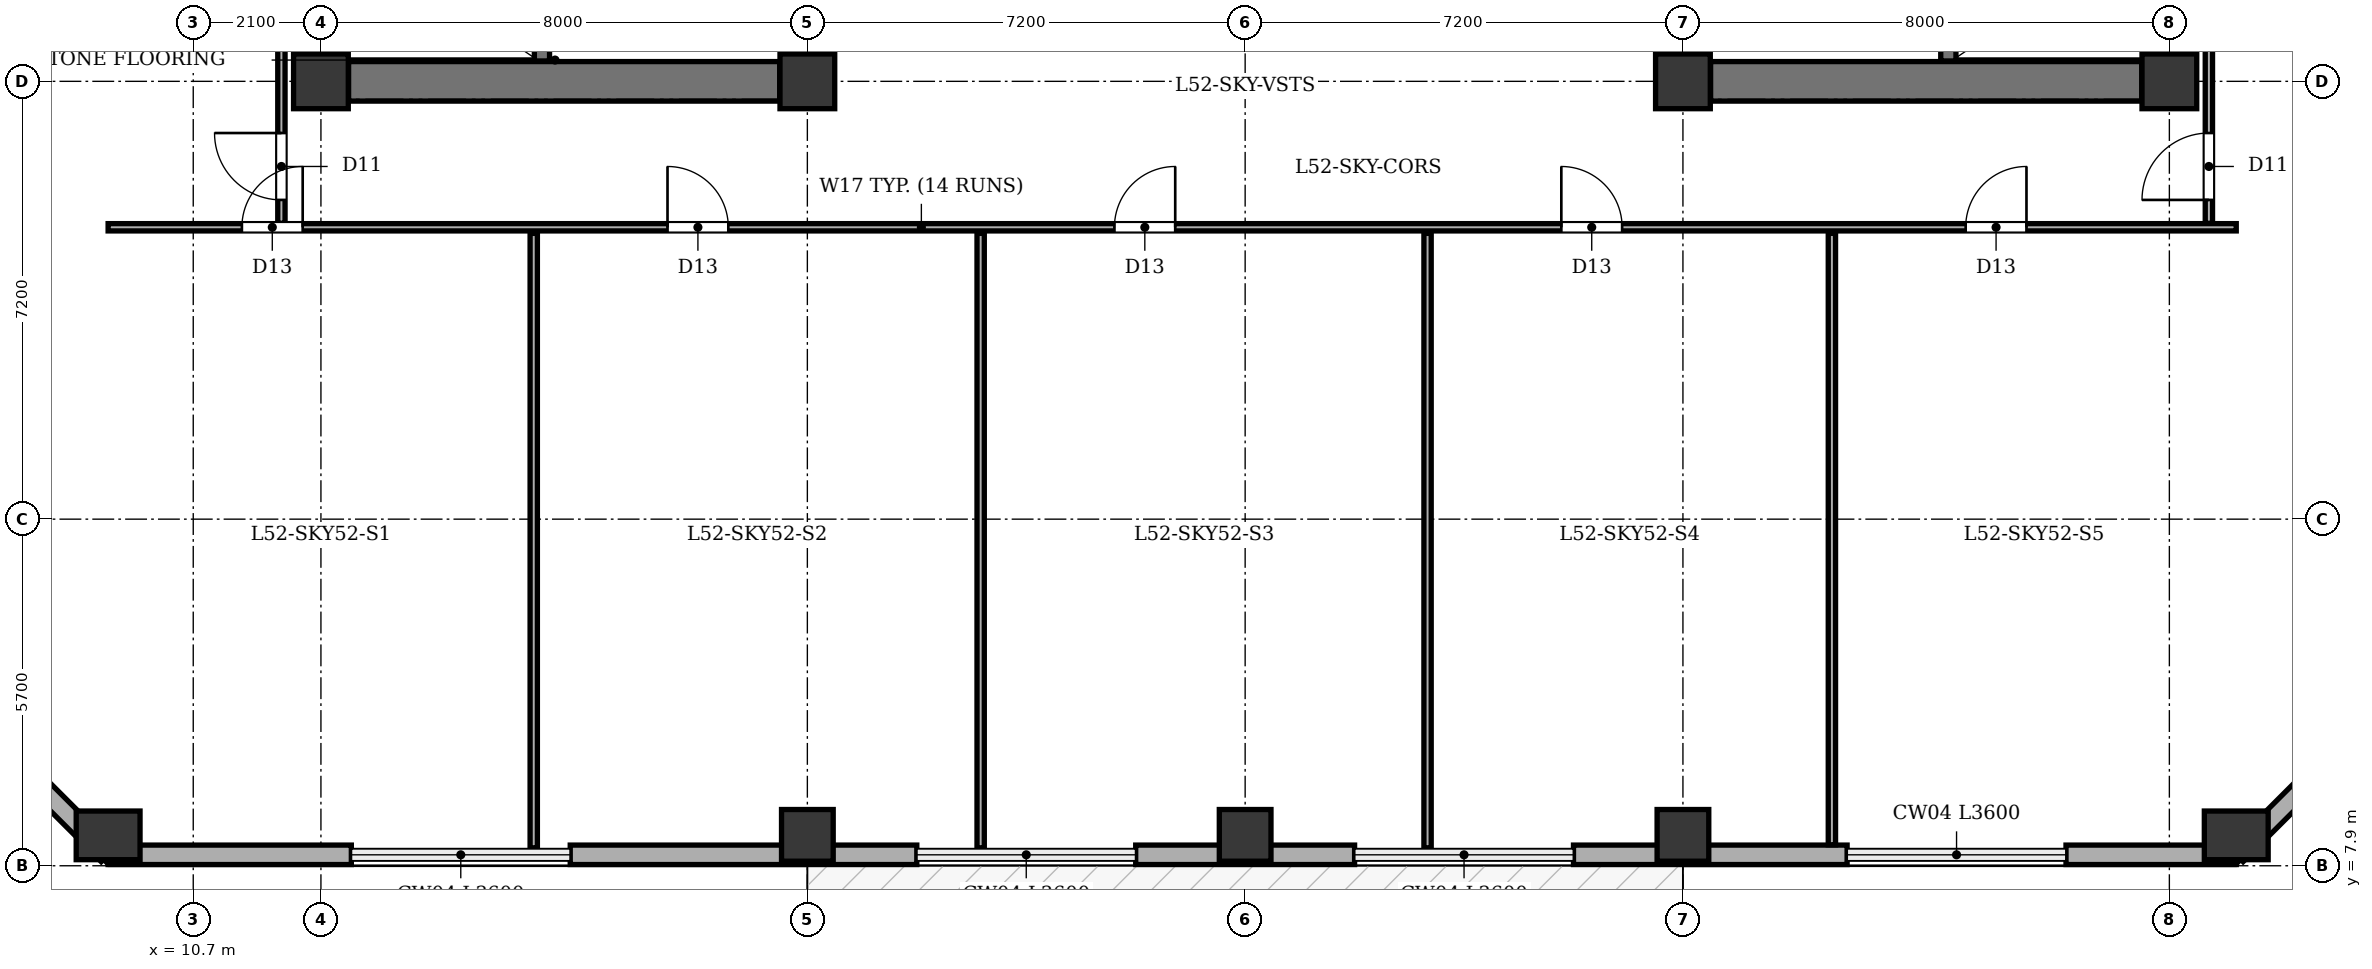
"""IFC4 building model, lengths in metres.
Left out: names, types, materials, properties, quantities, classifications, styles, units other than length and angle.
Written with IfcOpenShell. Run it as: python <this file> out.ifc"""

import sys

from ifc_helpers import new_model, si_unit, direction, frame, frame_2d, origin, origin_2d, place, context, subcontext, project, spatial, rectangle, extrude, element, fill, save


model = new_model("IFC4")
c1 = context("Model", 3, precision=1e-05, world=origin(), true_north=direction((0.0, 1.0)))
c2 = subcontext(c1, "Body", "Model", "MODEL_VIEW")
j1 = project(units=[si_unit("LENGTHUNIT", "METRE"), si_unit("PLANEANGLEUNIT", "RADIAN")], contexts=[c1])
p1 = place(None, origin())
s1 = spatial("IfcSite", under=j1, at=p1, CompositionType="ELEMENT")
p2 = place(p1, origin())
s2 = spatial("IfcBuilding", under=s1, at=p2, CompositionType="ELEMENT")
p3 = place(p2, frame((0.0, 0.0, 202.7)))
s3 = spatial("IfcBuildingStorey", under=s2, at=p3, CompositionType="ELEMENT", Elevation=202.7)
for number, where, z_axis, x_axis in (
    (1, (12.8, 20.8, 0.0), (0.0, 0.0, 1.0), (1.0, 0.0, 0.0)),
    (2, (20.8, 20.8, 0.0), (0.0, 0.0, 1.0), (1.0, 0.0, 0.0)),
    (3, (35.2, 20.8, 0.0), (0.0, 0.0, 1.0), (1.0, 0.0, 0.0)),
    (4, (43.2, 20.8, 0.0), (0.0, 0.0, 1.0), (1.0, 0.0, 0.0)),
):
    element("IfcColumn", number, at=place(p3, frame(where, z_axis=z_axis, x_axis=x_axis)), inside=s3, PredefinedType="COLUMN", context=c2, shape_type="SweptSolid", body=[
        extrude(rectangle(XDim=0.9, YDim=0.9, at=origin_2d()), origin(), (0.0, 0.0, 1.0), 4.8),
    ])
p4 = place(p3, frame((9.3, 8.4, 0.0), z_axis=(0.0, 0.0, 1.0), x_axis=(1.0, 0.0, 0.0)))
e5 = element("IfcColumn", 5, at=p4, inside=s3, PredefinedType="COLUMN", context=c2, shape_type="SweptSolid", body=[
    extrude(rectangle(XDim=0.8, YDim=1.05, at=origin_2d()), origin(), (0.0, 0.0, 1.0), 4.8),
])
for number, where, z_axis, x_axis in (
    (6, (20.8, 8.4, 0.0), (0.0, 0.0, 1.0), (1.0, 0.0, 0.0)),
    (7, (28.0, 8.4, 0.0), (0.0, 0.0, 1.0), (1.0, 0.0, 0.0)),
    (8, (35.2, 8.4, 0.0), (0.0, 0.0, 1.0), (1.0, 0.0, 0.0)),
):
    element("IfcColumn", number, at=place(p3, frame(where, z_axis=z_axis, x_axis=x_axis)), inside=s3, PredefinedType="COLUMN", context=c2, shape_type="SweptSolid", body=[
        extrude(rectangle(XDim=0.85, YDim=0.85, at=origin_2d()), origin(), (0.0, 0.0, 1.0), 4.8),
    ])
p5 = place(p3, frame((44.3, 8.4, 0.0), z_axis=(0.0, 0.0, 1.0), x_axis=(1.0, 0.0, 0.0)))
e9 = element("IfcColumn", 9, at=p5, inside=s3, PredefinedType="COLUMN", context=c2, shape_type="SweptSolid", body=[
    extrude(rectangle(XDim=0.8, YDim=1.05, at=origin_2d()), origin(), (0.0, 0.0, 1.0), 4.8),
])
p6 = place(p3, frame((44.3, 8.08, 0.0), z_axis=(0.0, 0.0, 1.0), x_axis=(-1.0, 0.0, 0.0)))
e10 = element("IfcWall", 10, at=p6, inside=s3, PredefinedType="STANDARD", context=c2, shape_type="SweptSolid", body=[
    extrude(rectangle(XDim=2.8, YDim=0.32, at=frame_2d((1.4, 0.0))), origin(), (0.0, 0.0, 1.0), 3.735),
])
p7 = place(p3, frame((37.9, 8.08, 0.0), z_axis=(0.0, 0.0, 1.0), x_axis=(-1.0, 0.0, 0.0)))
e11 = element("IfcWall", 11, at=p7, inside=s3, PredefinedType="STANDARD", context=c2, shape_type="SweptSolid", body=[
    extrude(rectangle(XDim=4.5, YDim=0.32, at=frame_2d((2.25, 0.0))), origin(), (0.0, 0.0, 1.0), 3.735),
])
p8 = place(p3, frame((29.8, 8.08, 0.0), z_axis=(0.0, 0.0, 1.0), x_axis=(-1.0, 0.0, 0.0)))
e12 = element("IfcWall", 12, at=p8, inside=s3, PredefinedType="STANDARD", context=c2, shape_type="SweptSolid", body=[
    extrude(rectangle(XDim=3.6, YDim=0.32, at=frame_2d((1.8, 0.0))), origin(), (0.0, 0.0, 1.0), 3.735),
])
p9 = place(p3, frame((22.6, 8.08, 0.0), z_axis=(0.0, 0.0, 1.0), x_axis=(-1.0, 0.0, 0.0)))
e13 = element("IfcWall", 13, at=p9, inside=s3, PredefinedType="STANDARD", context=c2, shape_type="SweptSolid", body=[
    extrude(rectangle(XDim=5.7, YDim=0.32, at=frame_2d((2.85, 0.0))), origin(), (0.0, 0.0, 1.0), 3.735),
])
p10 = place(p3, frame((13.3, 8.08, 0.0), z_axis=(0.0, 0.0, 1.0), x_axis=(-1.0, 0.0, 0.0)))
e14 = element("IfcWall", 14, at=p10, inside=s3, PredefinedType="STANDARD", context=c2, shape_type="SweptSolid", body=[
    extrude(rectangle(XDim=4.0, YDim=0.32, at=frame_2d((2.0, 0.0))), origin(), (0.0, 0.0, 1.0), 3.735),
])
for number, where, z_axis, x_axis in (
    (15, (9.3, 8.08, 0.0), (0.0, 0.0, 1.0), (-0.707, 0.707, 0.0)),
    (16, (49.12, 12.9, 0.0), (0.0, 0.0, 1.0), (-0.707, -0.707, 0.0)),
):
    element("IfcWall", number, at=place(p3, frame(where, z_axis=z_axis, x_axis=x_axis)), inside=s3, PredefinedType="STANDARD", context=c2, shape_type="SweptSolid", body=[
        extrude(rectangle(XDim=6.816, YDim=0.32, at=frame_2d((3.408, 0.0))), origin(), (0.0, 0.0, 1.0), 3.735),
    ])
p11 = place(p3, frame((12.8, 21.255, 0.0), z_axis=(0.0, 0.0, 1.0), x_axis=(0.0, 1.0, 0.0)))
e17 = element("IfcWall", 17, at=p11, inside=s3, PredefinedType="SHEAR", context=c2, shape_type="SweptSolid", body=[
    extrude(rectangle(XDim=11.89, YDim=0.65, at=frame_2d((5.945, 0.0))), origin(), (0.0, 0.0, 1.0), 4.35),
])
p12 = place(p3, frame((13.255, 20.8, 0.0), z_axis=(0.0, 0.0, 1.0), x_axis=(1.0, 0.0, 0.0)))
e18 = element("IfcWall", 18, at=p12, inside=s3, PredefinedType="SHEAR", context=c2, shape_type="SweptSolid", body=[
    extrude(rectangle(XDim=7.09, YDim=0.65, at=frame_2d((3.545, 0.0))), origin(), (0.0, 0.0, 1.0), 4.35),
])
p13 = place(p3, frame((20.8, 21.255, 0.0), z_axis=(0.0, 0.0, 1.0), x_axis=(0.0, 1.0, 0.0)))
e19 = element("IfcWall", 19, at=p13, inside=s3, PredefinedType="SHEAR", context=c2, shape_type="SweptSolid", body=[
    extrude(rectangle(XDim=3.795, YDim=0.65, at=frame_2d((1.897, 0.0))), origin(), (0.0, 0.0, 1.0), 4.35),
])
p14 = place(p13, frame((1.345, 0.0, 0.0)))
e20 = element("IfcOpeningElement", 20, at=p14, cuts=e19, PredefinedType="OPENING", context=c2, shape_type="SweptSolid", body=[
    extrude(rectangle(XDim=1.2, YDim=2.15, at=frame_2d((0.6, 1.075))), frame((0.0, 0.335, 0.0), z_axis=(0.0, -1.0, 0.0), x_axis=(1.0, 0.0, 0.0)), (0.0, 0.0, 1.0), 0.67),
])
p15 = place(p3, frame((16.435, 21.135, 0.0), z_axis=(0.0, 0.0, 1.0), x_axis=(0.0, 1.0, 0.0)))
e21 = element("IfcWall", 21, at=p15, inside=s3, PredefinedType="SHEAR", context=c2, shape_type="SweptSolid", body=[
    extrude(rectangle(XDim=12.13, YDim=0.25, at=frame_2d((6.065, 0.0))), origin(), (0.0, 0.0, 1.0), 4.35),
])
p16 = place(p15, frame((0.515, 0.0, 0.0)))
e22 = element("IfcOpeningElement", 22, at=p16, cuts=e21, PredefinedType="OPENING", context=c2, shape_type="SweptSolid", body=[
    extrude(rectangle(XDim=1.2, YDim=2.15, at=frame_2d((0.6, 1.075))), frame((0.0, 0.135, 0.0), z_axis=(0.0, -1.0, 0.0), x_axis=(1.0, 0.0, 0.0)), (0.0, 0.0, 1.0), 0.27),
])
p17 = place(p15, frame((2.665, 0.0, 0.0)))
e23 = element("IfcOpeningElement", 23, at=p17, cuts=e21, PredefinedType="OPENING", context=c2, shape_type="SweptSolid", body=[
    extrude(rectangle(XDim=1.15, YDim=2.15, at=frame_2d((0.575, 1.075))), frame((0.0, 0.135, 0.0), z_axis=(0.0, -1.0, 0.0), x_axis=(1.0, 0.0, 0.0)), (0.0, 0.0, 1.0), 0.27),
])
p18 = place(p3, frame((43.2, 21.255, 0.0), z_axis=(0.0, 0.0, 1.0), x_axis=(0.0, 1.0, 0.0)))
e24 = element("IfcWall", 24, at=p18, inside=s3, PredefinedType="SHEAR", context=c2, shape_type="SweptSolid", body=[
    extrude(rectangle(XDim=11.89, YDim=0.65, at=frame_2d((5.945, 0.0))), origin(), (0.0, 0.0, 1.0), 4.35),
])
p19 = place(p3, frame((35.655, 20.8, 0.0), z_axis=(0.0, 0.0, 1.0), x_axis=(1.0, 0.0, 0.0)))
e25 = element("IfcWall", 25, at=p19, inside=s3, PredefinedType="SHEAR", context=c2, shape_type="SweptSolid", body=[
    extrude(rectangle(XDim=7.09, YDim=0.65, at=frame_2d((3.545, 0.0))), origin(), (0.0, 0.0, 1.0), 4.35),
])
p20 = place(p3, frame((35.2, 21.255, 0.0), z_axis=(0.0, 0.0, 1.0), x_axis=(0.0, 1.0, 0.0)))
e26 = element("IfcWall", 26, at=p20, inside=s3, PredefinedType="SHEAR", context=c2, shape_type="SweptSolid", body=[
    extrude(rectangle(XDim=11.89, YDim=0.65, at=frame_2d((5.945, 0.0))), origin(), (0.0, 0.0, 1.0), 4.35),
])
p21 = place(p20, frame((1.345, 0.0, 0.0)))
e27 = element("IfcOpeningElement", 27, at=p21, cuts=e26, PredefinedType="OPENING", context=c2, shape_type="SweptSolid", body=[
    extrude(rectangle(XDim=1.2, YDim=2.15, at=frame_2d((0.6, 1.075))), frame((0.0, 0.335, 0.0), z_axis=(0.0, -1.0, 0.0), x_axis=(1.0, 0.0, 0.0)), (0.0, 0.0, 1.0), 0.67),
])
p22 = place(p20, frame((4.345, 0.0, 0.0)))
e28 = element("IfcOpeningElement", 28, at=p22, cuts=e26, PredefinedType="OPENING", context=c2, shape_type="SweptSolid", body=[
    extrude(rectangle(XDim=1.1, YDim=2.1, at=frame_2d((0.55, 1.05))), frame((0.0, 0.335, 0.0), z_axis=(0.0, -1.0, 0.0), x_axis=(1.0, 0.0, 0.0)), (0.0, 0.0, 1.0), 0.67),
])
p23 = place(p20, frame((6.295, 0.0, 0.0)))
e29 = element("IfcOpeningElement", 29, at=p23, cuts=e26, PredefinedType="OPENING", context=c2, shape_type="SweptSolid", body=[
    extrude(rectangle(XDim=1.1, YDim=2.1, at=frame_2d((0.55, 1.05))), frame((0.0, 0.335, 0.0), z_axis=(0.0, -1.0, 0.0), x_axis=(1.0, 0.0, 0.0)), (0.0, 0.0, 1.0), 0.67),
])
p24 = place(p20, frame((8.245, 0.0, 0.0)))
e30 = element("IfcOpeningElement", 30, at=p24, cuts=e26, PredefinedType="OPENING", context=c2, shape_type="SweptSolid", body=[
    extrude(rectangle(XDim=1.1, YDim=2.1, at=frame_2d((0.55, 1.05))), frame((0.0, 0.335, 0.0), z_axis=(0.0, -1.0, 0.0), x_axis=(1.0, 0.0, 0.0)), (0.0, 0.0, 1.0), 0.67),
])
p25 = place(p20, frame((10.445, 0.0, 0.0)))
e31 = element("IfcOpeningElement", 31, at=p25, cuts=e26, PredefinedType="OPENING", context=c2, shape_type="SweptSolid", body=[
    extrude(rectangle(XDim=1.1, YDim=2.1, at=frame_2d((0.55, 1.05))), frame((0.0, 0.335, 0.0), z_axis=(0.0, -1.0, 0.0), x_axis=(1.0, 0.0, 0.0)), (0.0, 0.0, 1.0), 0.67),
])
p26 = place(p3, frame((39.565, 21.135, 0.0), z_axis=(0.0, 0.0, 1.0), x_axis=(0.0, 1.0, 0.0)))
e32 = element("IfcWall", 32, at=p26, inside=s3, PredefinedType="SHEAR", context=c2, shape_type="SweptSolid", body=[
    extrude(rectangle(XDim=12.13, YDim=0.25, at=frame_2d((6.065, 0.0))), origin(), (0.0, 0.0, 1.0), 4.35),
])
p27 = place(p26, frame((0.515, 0.0, 0.0)))
e33 = element("IfcOpeningElement", 33, at=p27, cuts=e32, PredefinedType="OPENING", context=c2, shape_type="SweptSolid", body=[
    extrude(rectangle(XDim=1.2, YDim=2.15, at=frame_2d((0.6, 1.075))), frame((0.0, 0.135, 0.0), z_axis=(0.0, -1.0, 0.0), x_axis=(1.0, 0.0, 0.0)), (0.0, 0.0, 1.0), 0.27),
])
p28 = place(p26, frame((2.665, 0.0, 0.0)))
e34 = element("IfcOpeningElement", 34, at=p28, cuts=e32, PredefinedType="OPENING", context=c2, shape_type="SweptSolid", body=[
    extrude(rectangle(XDim=1.15, YDim=2.15, at=frame_2d((0.575, 1.075))), frame((0.0, 0.135, 0.0), z_axis=(0.0, -1.0, 0.0), x_axis=(1.0, 0.0, 0.0)), (0.0, 0.0, 1.0), 0.27),
])
p29 = place(p3, frame((9.3, 18.4, 0.0), z_axis=(0.0, 0.0, 1.0), x_axis=(1.0, 0.0, 0.0)))
e35 = element("IfcWall", 35, at=p29, inside=s3, PredefinedType="PARTITIONING", context=c2, shape_type="SweptSolid", body=[
    extrude(rectangle(XDim=35.0, YDim=0.12, at=frame_2d((17.5, 0.0))), origin(), (0.0, 0.0, 1.0), 4.35),
])
p30 = place(p29, frame((2.2, 0.0, 0.0)))
e36 = element("IfcOpeningElement", 36, at=p30, cuts=e35, PredefinedType="OPENING", context=c2, shape_type="SweptSolid", body=[
    extrude(rectangle(XDim=1.0, YDim=2.1, at=frame_2d((0.5, 1.05))), frame((0.0, 0.07, 0.0), z_axis=(0.0, -1.0, 0.0), x_axis=(1.0, 0.0, 0.0)), (0.0, 0.0, 1.0), 0.14),
])
p31 = place(p29, frame((9.2, 0.0, 0.0)))
e37 = element("IfcOpeningElement", 37, at=p31, cuts=e35, PredefinedType="OPENING", context=c2, shape_type="SweptSolid", body=[
    extrude(rectangle(XDim=1.0, YDim=2.1, at=frame_2d((0.5, 1.05))), frame((0.0, 0.07, 0.0), z_axis=(0.0, -1.0, 0.0), x_axis=(1.0, 0.0, 0.0)), (0.0, 0.0, 1.0), 0.14),
])
p32 = place(p29, frame((16.55, 0.0, 0.0)))
e38 = element("IfcOpeningElement", 38, at=p32, cuts=e35, PredefinedType="OPENING", context=c2, shape_type="SweptSolid", body=[
    extrude(rectangle(XDim=1.0, YDim=2.1, at=frame_2d((0.5, 1.05))), frame((0.0, 0.07, 0.0), z_axis=(0.0, -1.0, 0.0), x_axis=(1.0, 0.0, 0.0)), (0.0, 0.0, 1.0), 0.14),
])
p33 = place(p29, frame((23.9, 0.0, 0.0)))
e39 = element("IfcOpeningElement", 39, at=p33, cuts=e35, PredefinedType="OPENING", context=c2, shape_type="SweptSolid", body=[
    extrude(rectangle(XDim=1.0, YDim=2.1, at=frame_2d((0.5, 1.05))), frame((0.0, 0.07, 0.0), z_axis=(0.0, -1.0, 0.0), x_axis=(1.0, 0.0, 0.0)), (0.0, 0.0, 1.0), 0.14),
])
p34 = place(p29, frame((30.55, 0.0, 0.0)))
e40 = element("IfcOpeningElement", 40, at=p34, cuts=e35, PredefinedType="OPENING", context=c2, shape_type="SweptSolid", body=[
    extrude(rectangle(XDim=1.0, YDim=2.1, at=frame_2d((0.5, 1.05))), frame((0.0, 0.07, 0.0), z_axis=(0.0, -1.0, 0.0), x_axis=(1.0, 0.0, 0.0)), (0.0, 0.0, 1.0), 0.14),
])
p35 = place(p3, frame((16.3, 8.195, 0.0), z_axis=(0.0, 0.0, 1.0), x_axis=(0.0, 1.0, 0.0)))
e41 = element("IfcWall", 41, at=p35, inside=s3, PredefinedType="PARTITIONING", context=c2, shape_type="SweptSolid", body=[
    extrude(rectangle(XDim=10.105, YDim=0.12, at=frame_2d((5.052, 0.0))), origin(), (0.0, 0.0, 1.0), 3.785),
])
for number, where, z_axis, x_axis in (
    (42, (23.65, 8.195, 0.0), (0.0, 0.0, 1.0), (0.0, 1.0, 0.0)),
    (43, (31.0, 8.195, 0.0), (0.0, 0.0, 1.0), (0.0, 1.0, 0.0)),
):
    element("IfcWall", number, at=place(p3, frame(where, z_axis=z_axis, x_axis=x_axis)), inside=s3, PredefinedType="PARTITIONING", context=c2, shape_type="SweptSolid", body=[
        extrude(rectangle(XDim=10.105, YDim=0.12, at=frame_2d((5.052, 0.0))), origin(), (0.0, 0.0, 1.0), 4.35),
    ])
p36 = place(p3, frame((37.65, 8.245, 0.0), z_axis=(0.0, 0.0, 1.0), x_axis=(0.0, 1.0, 0.0)))
e44 = element("IfcWall", 44, at=p36, inside=s3, PredefinedType="PARTITIONING", context=c2, shape_type="SweptSolid", body=[
    extrude(rectangle(XDim=10.055, YDim=0.12, at=frame_2d((5.027, 0.0))), origin(), (0.0, 0.0, 1.0), 4.35),
])
p37 = place(p3, frame((12.15, 18.465, 0.0), z_axis=(0.0, 0.0, 1.0), x_axis=(0.0, 1.0, 0.0)))
e45 = element("IfcWall", 45, at=p37, inside=s3, PredefinedType="PARTITIONING", context=c2, shape_type="SweptSolid", body=[
    extrude(rectangle(XDim=17.67, YDim=0.12, at=frame_2d((8.835, 0.0))), origin(), (0.0, 0.0, 1.0), 4.35),
])
p38 = place(p37, frame((0.385, 0.0, 0.0)))
e46 = element("IfcOpeningElement", 46, at=p38, cuts=e45, PredefinedType="OPENING", context=c2, shape_type="SweptSolid", body=[
    extrude(rectangle(XDim=1.1, YDim=2.15, at=frame_2d((0.55, 1.075))), frame((0.0, 0.07, 0.0), z_axis=(0.0, -1.0, 0.0), x_axis=(1.0, 0.0, 0.0)), (0.0, 0.0, 1.0), 0.14),
])
p39 = place(p3, frame((43.85, 18.465, 0.0), z_axis=(0.0, 0.0, 1.0), x_axis=(0.0, 1.0, 0.0)))
e47 = element("IfcWall", 47, at=p39, inside=s3, PredefinedType="PARTITIONING", context=c2, shape_type="SweptSolid", body=[
    extrude(rectangle(XDim=17.67, YDim=0.12, at=frame_2d((8.835, 0.0))), origin(), (0.0, 0.0, 1.0), 4.35),
])
p40 = place(p39, frame((0.385, 0.0, 0.0)))
e48 = element("IfcOpeningElement", 48, at=p40, cuts=e47, PredefinedType="OPENING", context=c2, shape_type="SweptSolid", body=[
    extrude(rectangle(XDim=1.1, YDim=2.15, at=frame_2d((0.55, 1.075))), frame((0.0, 0.07, 0.0), z_axis=(0.0, -1.0, 0.0), x_axis=(1.0, 0.0, 0.0)), (0.0, 0.0, 1.0), 0.14),
])
p41 = place(p30, origin())
e49 = element("IfcDoor", 49, at=p41, inside=s3, OperationType="SINGLE_SWING_RIGHT", PredefinedType="DOOR", context=c2, shape_type="SweptSolid", body=[
    extrude(rectangle(XDim=1.0, YDim=2.1, at=frame_2d((0.5, 1.05))), frame((0.0, 0.025, 0.0), z_axis=(0.0, -1.0, 0.0), x_axis=(1.0, 0.0, 0.0)), (0.0, 0.0, 1.0), 0.05),
])
fill(e36, e49)
p42 = place(p31, origin())
e50 = element("IfcDoor", 50, at=p42, inside=s3, OperationType="SINGLE_SWING_LEFT", PredefinedType="DOOR", context=c2, shape_type="SweptSolid", body=[
    extrude(rectangle(XDim=1.0, YDim=2.1, at=frame_2d((0.5, 1.05))), frame((0.0, 0.025, 0.0), z_axis=(0.0, -1.0, 0.0), x_axis=(1.0, 0.0, 0.0)), (0.0, 0.0, 1.0), 0.05),
])
fill(e37, e50)
p43 = place(p32, origin())
e51 = element("IfcDoor", 51, at=p43, inside=s3, OperationType="SINGLE_SWING_RIGHT", PredefinedType="DOOR", context=c2, shape_type="SweptSolid", body=[
    extrude(rectangle(XDim=1.0, YDim=2.1, at=frame_2d((0.5, 1.05))), frame((0.0, 0.025, 0.0), z_axis=(0.0, -1.0, 0.0), x_axis=(1.0, 0.0, 0.0)), (0.0, 0.0, 1.0), 0.05),
])
fill(e38, e51)
p44 = place(p33, origin())
e52 = element("IfcDoor", 52, at=p44, inside=s3, OperationType="SINGLE_SWING_LEFT", PredefinedType="DOOR", context=c2, shape_type="SweptSolid", body=[
    extrude(rectangle(XDim=1.0, YDim=2.1, at=frame_2d((0.5, 1.05))), frame((0.0, 0.025, 0.0), z_axis=(0.0, -1.0, 0.0), x_axis=(1.0, 0.0, 0.0)), (0.0, 0.0, 1.0), 0.05),
])
fill(e39, e52)
p45 = place(p34, origin())
e53 = element("IfcDoor", 53, at=p45, inside=s3, OperationType="SINGLE_SWING_RIGHT", PredefinedType="DOOR", context=c2, shape_type="SweptSolid", body=[
    extrude(rectangle(XDim=1.0, YDim=2.1, at=frame_2d((0.5, 1.05))), frame((0.0, 0.025, 0.0), z_axis=(0.0, -1.0, 0.0), x_axis=(1.0, 0.0, 0.0)), (0.0, 0.0, 1.0), 0.05),
])
fill(e40, e53)
p46 = place(p38, origin())
e54 = element("IfcDoor", 54, at=p46, inside=s3, OperationType="SINGLE_SWING_RIGHT", PredefinedType="DOOR", context=c2, shape_type="SweptSolid", body=[
    extrude(rectangle(XDim=1.1, YDim=2.15, at=frame_2d((0.55, 1.075))), frame((0.0, 0.025, 0.0), z_axis=(0.0, -1.0, 0.0), x_axis=(1.0, 0.0, 0.0)), (0.0, 0.0, 1.0), 0.05),
])
fill(e46, e54)
p47 = place(p40, origin())
e55 = element("IfcDoor", 55, at=p47, inside=s3, OperationType="SINGLE_SWING_LEFT", PredefinedType="DOOR", context=c2, shape_type="SweptSolid", body=[
    extrude(rectangle(XDim=1.1, YDim=2.15, at=frame_2d((0.55, 1.075))), frame((0.0, 0.025, 0.0), z_axis=(0.0, -1.0, 0.0), x_axis=(1.0, 0.0, 0.0)), (0.0, 0.0, 1.0), 0.05),
])
fill(e48, e55)
save(model, sys.argv[1])
